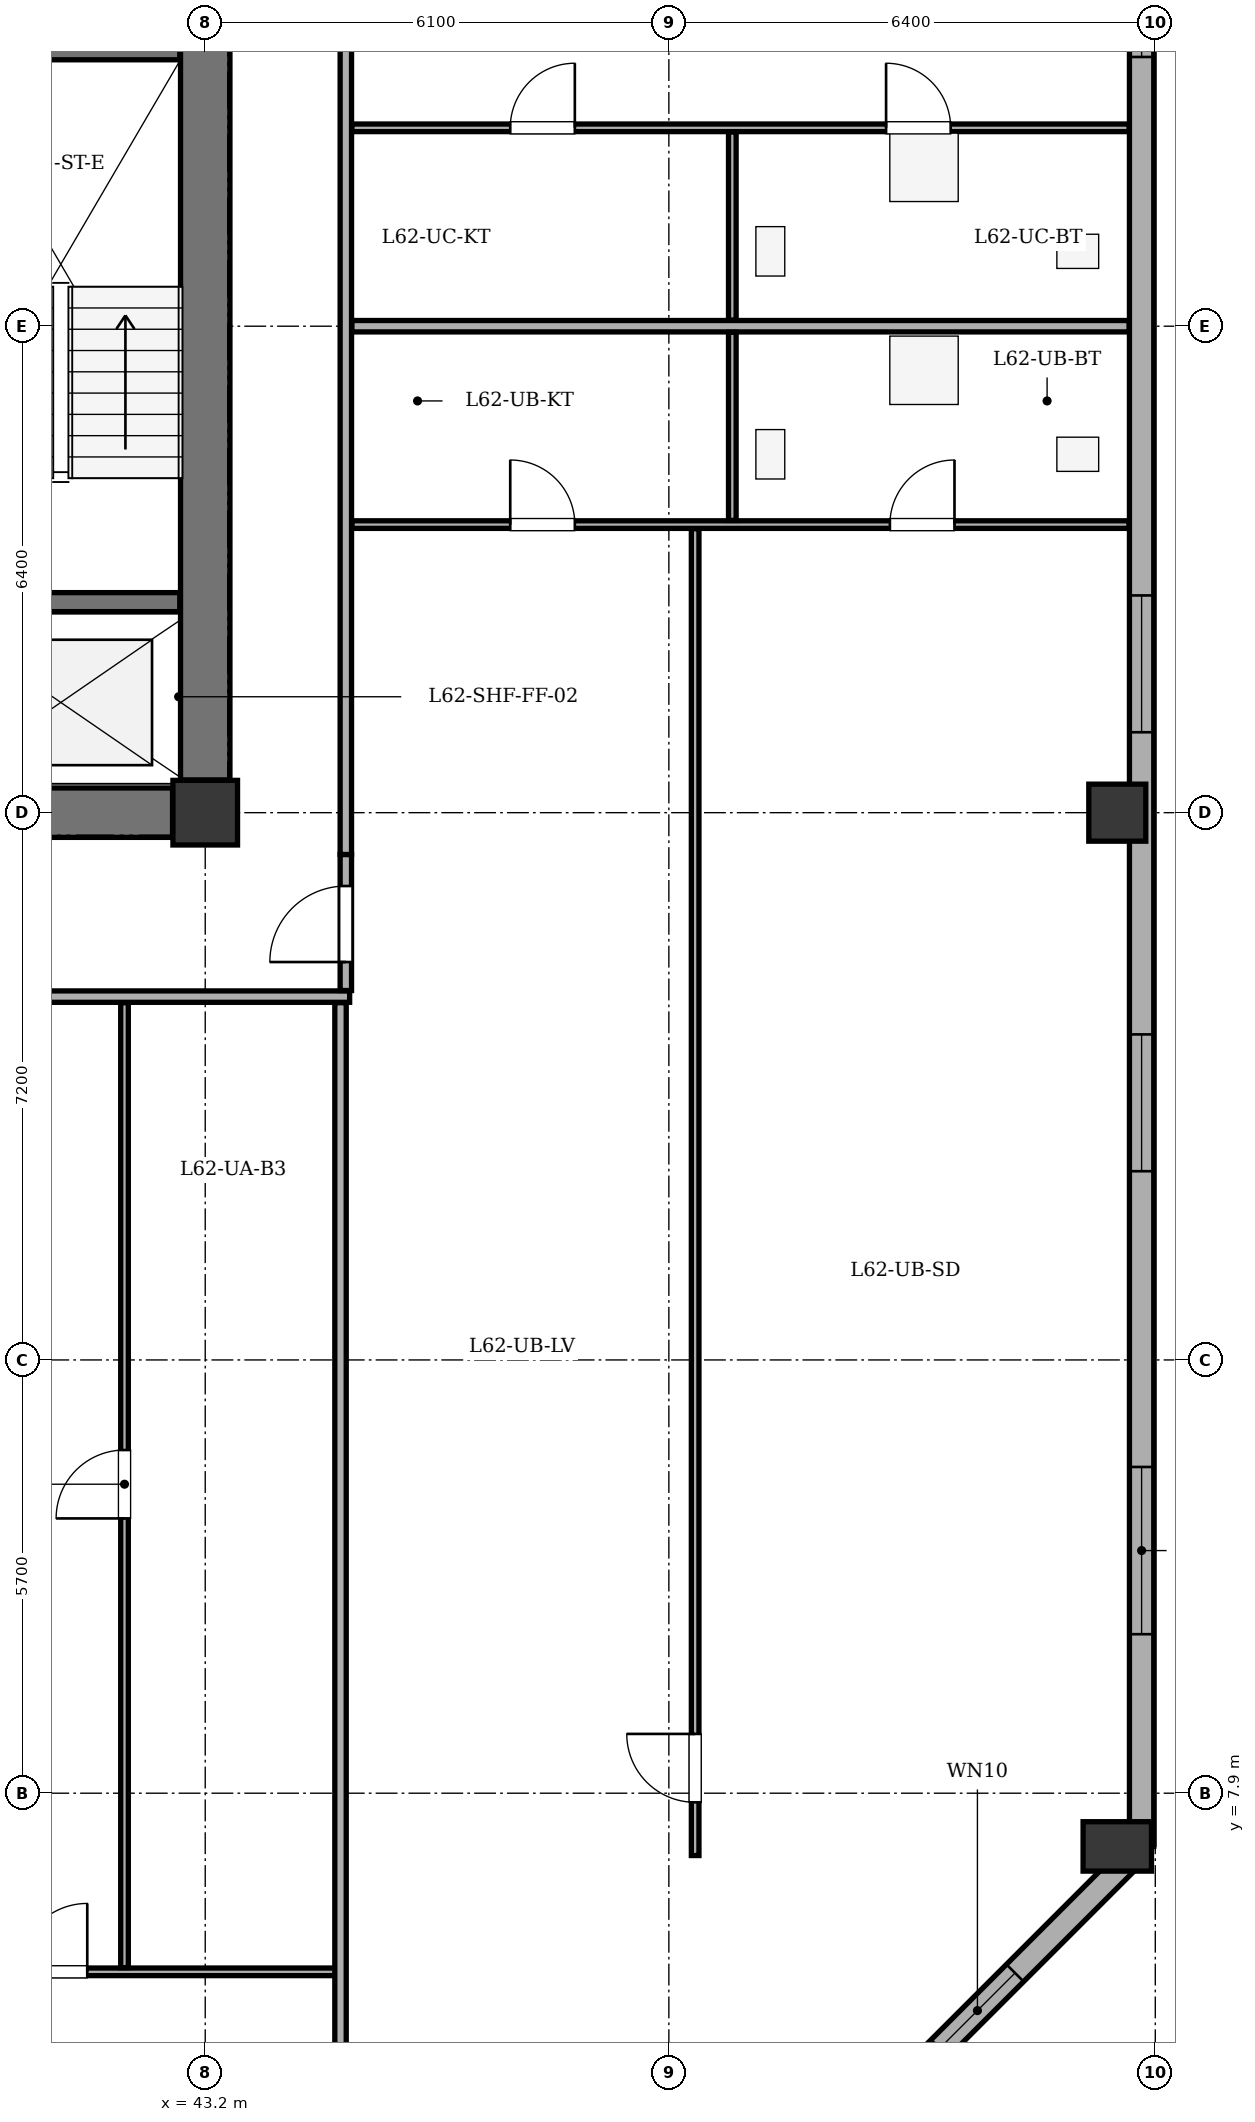
"""IFC4 building model, lengths in metres.
Left out: names, types, materials, properties, quantities, classifications, styles, units other than length and angle.
Written with IfcOpenShell. Run it as: python <this file> out.ifc"""

import sys

from ifc_helpers import new_model, si_unit, direction, frame, frame_2d, origin, origin_2d, place, context, subcontext, project, spatial, rectangle, extrude, element, fill, save


model = new_model("IFC4")
c1 = context("Model", 3, precision=1e-05, world=origin(), true_north=direction((0.0, 1.0)))
c2 = subcontext(c1, "Body", "Model", "MODEL_VIEW")
j1 = project(units=[si_unit("LENGTHUNIT", "METRE"), si_unit("PLANEANGLEUNIT", "RADIAN")], contexts=[c1])
p1 = place(None, origin())
s1 = spatial("IfcSite", under=j1, at=p1, CompositionType="ELEMENT")
p2 = place(p1, origin())
s2 = spatial("IfcBuilding", under=s1, at=p2, CompositionType="ELEMENT")
p3 = place(p2, frame((0.0, 0.0, 238.1)))
s3 = spatial("IfcBuildingStorey", under=s2, at=p3, CompositionType="ELEMENT", Elevation=238.1)
p4 = place(p3, frame((43.2, 20.8, 0.0), z_axis=(0.0, 0.0, 1.0), x_axis=(1.0, 0.0, 0.0)))
e1 = element("IfcColumn", 1, at=p4, inside=s3, PredefinedType="COLUMN", context=c2, shape_type="SweptSolid", body=[
    extrude(rectangle(XDim=0.85, YDim=0.85, at=origin_2d()), origin(), (0.0, 0.0, 1.0), 3.4),
])
p5 = place(p3, frame((55.2, 7.2, 0.0), z_axis=(0.0, 0.0, 1.0), x_axis=(1.0, 0.0, 0.0)))
e2 = element("IfcColumn", 2, at=p5, inside=s3, PredefinedType="COLUMN", context=c2, shape_type="SweptSolid", body=[
    extrude(rectangle(XDim=0.65, YDim=0.9, at=origin_2d()), origin(), (0.0, 0.0, 1.0), 3.4),
])
p6 = place(p3, frame((55.2, 20.8, 0.0), z_axis=(0.0, 0.0, 1.0), x_axis=(1.0, 0.0, 0.0)))
e3 = element("IfcColumn", 3, at=p6, inside=s3, PredefinedType="COLUMN", context=c2, shape_type="SweptSolid", body=[
    extrude(rectangle(XDim=0.75, YDim=0.75, at=origin_2d()), origin(), (0.0, 0.0, 1.0), 3.4),
])
p7 = place(p3, frame((55.52, 35.0, 0.0), z_axis=(0.0, 0.0, 1.0), x_axis=(0.0, -1.0, 0.0)))
e4 = element("IfcWall", 4, at=p7, inside=s3, PredefinedType="STANDARD", context=c2, shape_type="SweptSolid", body=[
    extrude(rectangle(XDim=27.8, YDim=0.32, at=frame_2d((13.9, 0.0))), origin(), (0.0, 0.0, 1.0), 2.725),
])
p8 = place(p7, frame((2.458, 0.0, 0.75)))
e5 = element("IfcOpeningElement", 5, at=p8, cuts=e4, PredefinedType="OPENING", context=c2, shape_type="SweptSolid", body=[
    extrude(rectangle(XDim=1.8, YDim=1.7, at=frame_2d((0.9, 0.85))), frame((0.0, 0.17, 0.0), z_axis=(0.0, -1.0, 0.0), x_axis=(1.0, 0.0, 0.0)), (0.0, 0.0, 1.0), 0.34),
])
p9 = place(p7, frame((11.342, 0.0, 0.75)))
e6 = element("IfcOpeningElement", 6, at=p9, cuts=e4, PredefinedType="OPENING", context=c2, shape_type="SweptSolid", body=[
    extrude(rectangle(XDim=1.8, YDim=1.7, at=frame_2d((0.9, 0.85))), frame((0.0, 0.17, 0.0), z_axis=(0.0, -1.0, 0.0), x_axis=(1.0, 0.0, 0.0)), (0.0, 0.0, 1.0), 0.34),
])
p10 = place(p7, frame((17.117, 0.0, 0.75)))
e7 = element("IfcOpeningElement", 7, at=p10, cuts=e4, PredefinedType="OPENING", context=c2, shape_type="SweptSolid", body=[
    extrude(rectangle(XDim=1.8, YDim=1.7, at=frame_2d((0.9, 0.85))), frame((0.0, 0.17, 0.0), z_axis=(0.0, -1.0, 0.0), x_axis=(1.0, 0.0, 0.0)), (0.0, 0.0, 1.0), 0.34),
])
p11 = place(p7, frame((22.808, 0.0, 0.75)))
e8 = element("IfcOpeningElement", 8, at=p11, cuts=e4, PredefinedType="OPENING", context=c2, shape_type="SweptSolid", body=[
    extrude(rectangle(XDim=2.2, YDim=1.7, at=frame_2d((1.1, 0.85))), frame((0.0, 0.17, 0.0), z_axis=(0.0, -1.0, 0.0), x_axis=(1.0, 0.0, 0.0)), (0.0, 0.0, 1.0), 0.34),
])
p12 = place(p3, frame((55.52, 7.2, 0.0), z_axis=(0.0, 0.0, 1.0), x_axis=(-0.707106781187, -0.707106781187, 0.0)))
e9 = element("IfcWall", 9, at=p12, inside=s3, PredefinedType="STANDARD", context=c2, shape_type="SweptSolid", body=[
    extrude(rectangle(XDim=6.11, YDim=0.32, at=frame_2d((3.055, 0.0))), origin(), (0.0, 0.0, 1.0), 2.725),
])
p13 = place(p12, frame((2.355, 0.0, 0.75)))
e10 = element("IfcOpeningElement", 10, at=p13, cuts=e9, PredefinedType="OPENING", context=c2, shape_type="SweptSolid", body=[
    extrude(rectangle(XDim=1.4, YDim=1.65, at=frame_2d((0.7, 0.825))), frame((0.0, 0.17, 0.0), z_axis=(0.0, -1.0, 0.0), x_axis=(1.0, 0.0, 0.0)), (0.0, 0.0, 1.0), 0.34),
])
p14 = place(p3, frame((43.2, 21.23, 0.0), z_axis=(0.0, 0.0, 1.0), x_axis=(0.0, 1.0, 0.0)))
e11 = element("IfcWall", 11, at=p14, inside=s3, PredefinedType="SHEAR", context=c2, shape_type="SweptSolid", body=[
    extrude(rectangle(XDim=11.94, YDim=0.65, at=frame_2d((5.97, 0.0))), origin(), (0.0, 0.0, 1.0), 3.1),
])
p15 = place(p3, frame((35.63, 20.8, 0.0), z_axis=(0.0, 0.0, 1.0), x_axis=(1.0, 0.0, 0.0)))
e12 = element("IfcWall", 12, at=p15, inside=s3, PredefinedType="SHEAR", context=c2, shape_type="SweptSolid", body=[
    extrude(rectangle(XDim=7.14, YDim=0.65, at=frame_2d((3.57, 0.0))), origin(), (0.0, 0.0, 1.0), 3.1),
])
for number, where, z_axis, x_axis in (
    (13, (39.69, 23.57, 0.0), (0.0, 0.0, 1.0), (1.0, 0.0, 0.0)),
    (14, (39.69, 30.83, 0.0), (0.0, 0.0, 1.0), (1.0, 0.0, 0.0)),
):
    element("IfcWall", number, at=place(p3, frame(where, z_axis=z_axis, x_axis=x_axis)), inside=s3, PredefinedType="SHEAR", context=c2, shape_type="SweptSolid", body=[
        extrude(rectangle(XDim=3.175, YDim=0.25, at=frame_2d((1.587, 0.0))), origin(), (0.0, 0.0, 1.0), 3.1),
    ])
p16 = place(p3, frame((15.08, 18.38, 0.0), z_axis=(0.0, 0.0, 1.0), x_axis=(1.0, 0.0, 0.0)))
e15 = element("IfcWall", 15, at=p16, inside=s3, PredefinedType="PARTITIONING", context=c2, shape_type="SweptSolid", body=[
    extrude(rectangle(XDim=30.02, YDim=0.15, at=frame_2d((15.01, 0.0))), origin(), (0.0, 0.0, 1.0), 3.1),
])
p17 = place(p16, frame((14.51, 0.0, 0.0)))
e16 = element("IfcOpeningElement", 16, at=p17, cuts=e15, PredefinedType="OPENING", context=c2, shape_type="SweptSolid", body=[
    extrude(rectangle(XDim=1.0, YDim=2.1, at=frame_2d((0.5, 1.05))), frame((0.0, 0.085, 0.0), z_axis=(0.0, -1.0, 0.0), x_axis=(1.0, 0.0, 0.0)), (0.0, 0.0, 1.0), 0.17),
])
p18 = place(p3, frame((15.28, 5.55, 0.0), z_axis=(0.0, 0.0, 1.0), x_axis=(1.0, 0.0, 0.0)))
e17 = element("IfcWall", 17, at=p18, inside=s3, PredefinedType="PARTITIONING", context=c2, shape_type="SweptSolid", body=[
    extrude(rectangle(XDim=29.74, YDim=0.1, at=frame_2d((14.87, 0.0))), origin(), (0.0, 0.0, 1.0), 3.1),
])
p19 = place(p18, frame((0.65, 0.0, 0.0)))
e18 = element("IfcOpeningElement", 18, at=p19, cuts=e17, PredefinedType="OPENING", context=c2, shape_type="SweptSolid", body=[
    extrude(rectangle(XDim=0.85, YDim=2.05, at=frame_2d((0.425, 1.025))), frame((0.0, 0.06, 0.0), z_axis=(0.0, -1.0, 0.0), x_axis=(1.0, 0.0, 0.0)), (0.0, 0.0, 1.0), 0.12),
])
p20 = place(p18, frame((8.055, 0.0, 0.0)))
e19 = element("IfcOpeningElement", 19, at=p20, cuts=e17, PredefinedType="OPENING", context=c2, shape_type="SweptSolid", body=[
    extrude(rectangle(XDim=0.85, YDim=2.05, at=frame_2d((0.425, 1.025))), frame((0.0, 0.06, 0.0), z_axis=(0.0, -1.0, 0.0), x_axis=(1.0, 0.0, 0.0)), (0.0, 0.0, 1.0), 0.12),
])
p21 = place(p18, frame((18.062, 0.0, 0.0)))
e20 = element("IfcOpeningElement", 20, at=p21, cuts=e17, PredefinedType="OPENING", context=c2, shape_type="SweptSolid", body=[
    extrude(rectangle(XDim=0.9, YDim=2.05, at=frame_2d((0.45, 1.025))), frame((0.0, 0.06, 0.0), z_axis=(0.0, -1.0, 0.0), x_axis=(1.0, 0.0, 0.0)), (0.0, 0.0, 1.0), 0.12),
])
p22 = place(p18, frame((25.468, 0.0, 0.0)))
e21 = element("IfcOpeningElement", 21, at=p22, cuts=e17, PredefinedType="OPENING", context=c2, shape_type="SweptSolid", body=[
    extrude(rectangle(XDim=0.9, YDim=2.05, at=frame_2d((0.45, 1.025))), frame((0.0, 0.06, 0.0), z_axis=(0.0, -1.0, 0.0), x_axis=(1.0, 0.0, 0.0)), (0.0, 0.0, 1.0), 0.12),
])
p23 = place(p3, frame((42.138, 5.605, 0.0), z_axis=(0.0, 0.0, 1.0), x_axis=(0.0, 1.0, 0.0)))
e22 = element("IfcWall", 22, at=p23, inside=s3, PredefinedType="PARTITIONING", context=c2, shape_type="SweptSolid", body=[
    extrude(rectangle(XDim=12.695, YDim=0.1, at=frame_2d((6.348, 0.0))), origin(), (0.0, 0.0, 1.0), 2.725),
])
p24 = place(p23, frame((5.91, 0.0, 0.0)))
e23 = element("IfcOpeningElement", 23, at=p24, cuts=e22, PredefinedType="OPENING", context=c2, shape_type="SweptSolid", body=[
    extrude(rectangle(XDim=0.9, YDim=2.05, at=frame_2d((0.45, 1.025))), frame((0.0, 0.06, 0.0), z_axis=(0.0, -1.0, 0.0), x_axis=(1.0, 0.0, 0.0)), (0.0, 0.0, 1.0), 0.12),
])
p25 = place(p3, frame((44.98, 3.045, 0.0), z_axis=(0.0, 0.0, 1.0), x_axis=(0.0, 1.0, 0.0)))
e24 = element("IfcWall", 24, at=p25, inside=s3, PredefinedType="PARTITIONING", context=c2, shape_type="SweptSolid", body=[
    extrude(rectangle(XDim=15.255, YDim=0.15, at=frame_2d((7.627, 0.0))), origin(), (0.0, 0.0, 1.0), 2.725),
])
p26 = place(p3, frame((45.05, 18.46, 0.0), z_axis=(0.0, 0.0, 1.0), x_axis=(0.0, 1.0, 0.0)))
e25 = element("IfcWall", 25, at=p26, inside=s3, PredefinedType="PARTITIONING", context=c2, shape_type="SweptSolid", body=[
    extrude(rectangle(XDim=1.79, YDim=0.15, at=frame_2d((0.895, 0.0))), origin(), (0.0, 0.0, 1.0), 2.725),
])
p27 = place(p26, frame((0.375, 0.0, 0.0)))
e26 = element("IfcOpeningElement", 26, at=p27, cuts=e25, PredefinedType="OPENING", context=c2, shape_type="SweptSolid", body=[
    extrude(rectangle(XDim=1.0, YDim=2.1, at=frame_2d((0.5, 1.05))), frame((0.0, 0.085, 0.0), z_axis=(0.0, -1.0, 0.0), x_axis=(1.0, 0.0, 0.0)), (0.0, 0.0, 1.0), 0.17),
])
p28 = place(p3, frame((45.05, 20.25, 0.0), z_axis=(0.0, 0.0, 1.0), x_axis=(0.0, 1.0, 0.0)))
e27 = element("IfcWall", 27, at=p28, inside=s3, PredefinedType="PARTITIONING", context=c2, shape_type="SweptSolid", body=[
    extrude(rectangle(XDim=13.9, YDim=0.15, at=frame_2d((6.95, 0.0))), origin(), (0.0, 0.0, 1.0), 2.725),
])
p29 = place(p3, frame((45.13, 27.2, 0.0), z_axis=(0.0, 0.0, 1.0), x_axis=(1.0, 0.0, 0.0)))
e28 = element("IfcWall", 28, at=p29, inside=s3, PredefinedType="PARTITIONING", context=c2, shape_type="SweptSolid", body=[
    extrude(rectangle(XDim=10.225, YDim=0.15, at=frame_2d((5.113, 0.0))), origin(), (0.0, 0.0, 1.0), 2.725),
])
p30 = place(p3, frame((45.13, 24.59, 0.0), z_axis=(0.0, 0.0, 1.0), x_axis=(1.0, 0.0, 0.0)))
e29 = element("IfcWall", 29, at=p30, inside=s3, PredefinedType="PARTITIONING", context=c2, shape_type="SweptSolid", body=[
    extrude(rectangle(XDim=10.225, YDim=0.1, at=frame_2d((5.113, 0.0))), origin(), (0.0, 0.0, 1.0), 3.1),
])
p31 = place(p30, frame((2.083, 0.0, 0.0)))
e30 = element("IfcOpeningElement", 30, at=p31, cuts=e29, PredefinedType="OPENING", context=c2, shape_type="SweptSolid", body=[
    extrude(rectangle(XDim=0.85, YDim=2.05, at=frame_2d((0.425, 1.025))), frame((0.0, 0.06, 0.0), z_axis=(0.0, -1.0, 0.0), x_axis=(1.0, 0.0, 0.0)), (0.0, 0.0, 1.0), 0.12),
])
p32 = place(p30, frame((7.078, 0.0, 0.0)))
e31 = element("IfcOpeningElement", 31, at=p32, cuts=e29, PredefinedType="OPENING", context=c2, shape_type="SweptSolid", body=[
    extrude(rectangle(XDim=0.85, YDim=2.05, at=frame_2d((0.425, 1.025))), frame((0.0, 0.06, 0.0), z_axis=(0.0, -1.0, 0.0), x_axis=(1.0, 0.0, 0.0)), (0.0, 0.0, 1.0), 0.12),
])
p33 = place(p3, frame((49.646, 7.08, 0.0), z_axis=(0.0, 0.0, 1.0), x_axis=(0.0, 1.0, 0.0)))
e32 = element("IfcWall", 32, at=p33, inside=s3, PredefinedType="PARTITIONING", context=c2, shape_type="SweptSolid", body=[
    extrude(rectangle(XDim=17.455, YDim=0.1, at=frame_2d((8.728, 0.0))), origin(), (0.0, 0.0, 1.0), 3.1),
])
p34 = place(p33, frame((0.7, 0.0, 0.0)))
e33 = element("IfcOpeningElement", 33, at=p34, cuts=e32, PredefinedType="OPENING", context=c2, shape_type="SweptSolid", body=[
    extrude(rectangle(XDim=0.9, YDim=2.05, at=frame_2d((0.45, 1.025))), frame((0.0, 0.06, 0.0), z_axis=(0.0, -1.0, 0.0), x_axis=(1.0, 0.0, 0.0)), (0.0, 0.0, 1.0), 0.12),
])
p35 = place(p3, frame((50.135, 24.645, 0.0), z_axis=(0.0, 0.0, 1.0), x_axis=(0.0, 1.0, 0.0)))
e34 = element("IfcWall", 34, at=p35, inside=s3, PredefinedType="PARTITIONING", context=c2, shape_type="SweptSolid", body=[
    extrude(rectangle(XDim=2.475, YDim=0.1, at=frame_2d((1.238, 0.0))), origin(), (0.0, 0.0, 1.0), 3.1),
])
p36 = place(p3, frame((45.13, 29.81, 0.0), z_axis=(0.0, 0.0, 1.0), x_axis=(1.0, 0.0, 0.0)))
e35 = element("IfcWall", 35, at=p36, inside=s3, PredefinedType="PARTITIONING", context=c2, shape_type="SweptSolid", body=[
    extrude(rectangle(XDim=10.225, YDim=0.1, at=frame_2d((5.113, 0.0))), origin(), (0.0, 0.0, 1.0), 3.1),
])
p37 = place(p36, frame((2.083, 0.0, 0.0)))
e36 = element("IfcOpeningElement", 36, at=p37, cuts=e35, PredefinedType="OPENING", context=c2, shape_type="SweptSolid", body=[
    extrude(rectangle(XDim=0.85, YDim=2.05, at=frame_2d((0.425, 1.025))), frame((0.0, 0.06, 0.0), z_axis=(0.0, -1.0, 0.0), x_axis=(1.0, 0.0, 0.0)), (0.0, 0.0, 1.0), 0.12),
])
p38 = place(p36, frame((7.028, 0.0, 0.0)))
e37 = element("IfcOpeningElement", 37, at=p38, cuts=e35, PredefinedType="OPENING", context=c2, shape_type="SweptSolid", body=[
    extrude(rectangle(XDim=0.85, YDim=2.05, at=frame_2d((0.425, 1.025))), frame((0.0, 0.06, 0.0), z_axis=(0.0, -1.0, 0.0), x_axis=(1.0, 0.0, 0.0)), (0.0, 0.0, 1.0), 0.12),
])
p39 = place(p3, frame((50.135, 27.28, 0.0), z_axis=(0.0, 0.0, 1.0), x_axis=(0.0, 1.0, 0.0)))
e38 = element("IfcWall", 38, at=p39, inside=s3, PredefinedType="PARTITIONING", context=c2, shape_type="SweptSolid", body=[
    extrude(rectangle(XDim=2.475, YDim=0.1, at=frame_2d((1.237, 0.0))), origin(), (0.0, 0.0, 1.0), 3.1),
])
p40 = place(p8, origin())
e39 = element("IfcWindow", 39, at=p40, inside=s3, PartitioningType="SINGLE_PANEL", PredefinedType="WINDOW", context=c2, shape_type="SweptSolid", body=[
    extrude(rectangle(XDim=1.8, YDim=1.7, at=frame_2d((0.9, 0.85))), frame((0.0, -0.01, 0.0), z_axis=(0.0, -1.0, 0.0), x_axis=(1.0, 0.0, 0.0)), (0.0, 0.0, 1.0), 0.06),
])
fill(e5, e39)
p41 = place(p9, origin())
e40 = element("IfcWindow", 40, at=p41, inside=s3, PartitioningType="SINGLE_PANEL", PredefinedType="WINDOW", context=c2, shape_type="SweptSolid", body=[
    extrude(rectangle(XDim=1.8, YDim=1.7, at=frame_2d((0.9, 0.85))), frame((0.0, -0.01, 0.0), z_axis=(0.0, -1.0, 0.0), x_axis=(1.0, 0.0, 0.0)), (0.0, 0.0, 1.0), 0.06),
])
fill(e6, e40)
p42 = place(p10, origin())
e41 = element("IfcWindow", 41, at=p42, inside=s3, PartitioningType="SINGLE_PANEL", PredefinedType="WINDOW", context=c2, shape_type="SweptSolid", body=[
    extrude(rectangle(XDim=1.8, YDim=1.7, at=frame_2d((0.9, 0.85))), frame((0.0, -0.01, 0.0), z_axis=(0.0, -1.0, 0.0), x_axis=(1.0, 0.0, 0.0)), (0.0, 0.0, 1.0), 0.06),
])
fill(e7, e41)
p43 = place(p11, origin())
e42 = element("IfcWindow", 42, at=p43, inside=s3, PartitioningType="SINGLE_PANEL", PredefinedType="WINDOW", context=c2, shape_type="SweptSolid", body=[
    extrude(rectangle(XDim=2.2, YDim=1.7, at=frame_2d((1.1, 0.85))), frame((0.0, -0.01, 0.0), z_axis=(0.0, -1.0, 0.0), x_axis=(1.0, 0.0, 0.0)), (0.0, 0.0, 1.0), 0.06),
])
fill(e8, e42)
p44 = place(p13, origin())
e43 = element("IfcWindow", 43, at=p44, inside=s3, PartitioningType="SINGLE_PANEL", PredefinedType="WINDOW", context=c2, shape_type="SweptSolid", body=[
    extrude(rectangle(XDim=1.4, YDim=1.65, at=frame_2d((0.7, 0.825))), frame((0.0, -0.01, 0.0), z_axis=(0.0, -1.0, 0.0), x_axis=(1.0, 0.0, 0.0)), (0.0, 0.0, 1.0), 0.06),
])
fill(e10, e43)
p45 = place(p24, origin())
e44 = element("IfcDoor", 44, at=p45, inside=s3, OperationType="SINGLE_SWING_LEFT", PredefinedType="DOOR", context=c2, shape_type="SweptSolid", body=[
    extrude(rectangle(XDim=0.9, YDim=2.05, at=frame_2d((0.45, 1.025))), frame((0.0, 0.025, 0.0), z_axis=(0.0, -1.0, 0.0), x_axis=(1.0, 0.0, 0.0)), (0.0, 0.0, 1.0), 0.05),
])
fill(e23, e44)
p46 = place(p22, origin())
e45 = element("IfcDoor", 45, at=p46, inside=s3, OperationType="SINGLE_SWING_RIGHT", PredefinedType="DOOR", context=c2, shape_type="SweptSolid", body=[
    extrude(rectangle(XDim=0.9, YDim=2.05, at=frame_2d((0.45, 1.025))), frame((0.0, 0.025, 0.0), z_axis=(0.0, -1.0, 0.0), x_axis=(1.0, 0.0, 0.0)), (0.0, 0.0, 1.0), 0.05),
])
fill(e21, e45)
p47 = place(p27, origin())
e46 = element("IfcDoor", 46, at=p47, inside=s3, OperationType="SINGLE_SWING_LEFT", PredefinedType="DOOR", context=c2, shape_type="SweptSolid", body=[
    extrude(rectangle(XDim=1.0, YDim=2.1, at=frame_2d((0.5, 1.05))), frame((0.0, 0.025, 0.0), z_axis=(0.0, -1.0, 0.0), x_axis=(1.0, 0.0, 0.0)), (0.0, 0.0, 1.0), 0.05),
])
fill(e26, e46)
p48 = place(p34, origin())
e47 = element("IfcDoor", 47, at=p48, inside=s3, OperationType="SINGLE_SWING_RIGHT", PredefinedType="DOOR", context=c2, shape_type="SweptSolid", body=[
    extrude(rectangle(XDim=0.9, YDim=2.05, at=frame_2d((0.45, 1.025))), frame((0.0, 0.025, 0.0), z_axis=(0.0, -1.0, 0.0), x_axis=(1.0, 0.0, 0.0)), (0.0, 0.0, 1.0), 0.05),
])
fill(e33, e47)
p49 = place(p31, origin())
e48 = element("IfcDoor", 48, at=p49, inside=s3, OperationType="SINGLE_SWING_LEFT", PredefinedType="DOOR", context=c2, shape_type="SweptSolid", body=[
    extrude(rectangle(XDim=0.85, YDim=2.05, at=frame_2d((0.425, 1.025))), frame((0.0, 0.025, 0.0), z_axis=(0.0, -1.0, 0.0), x_axis=(1.0, 0.0, 0.0)), (0.0, 0.0, 1.0), 0.05),
])
fill(e30, e48)
p50 = place(p32, origin())
e49 = element("IfcDoor", 49, at=p50, inside=s3, OperationType="SINGLE_SWING_RIGHT", PredefinedType="DOOR", context=c2, shape_type="SweptSolid", body=[
    extrude(rectangle(XDim=0.85, YDim=2.05, at=frame_2d((0.425, 1.025))), frame((0.0, 0.025, 0.0), z_axis=(0.0, -1.0, 0.0), x_axis=(1.0, 0.0, 0.0)), (0.0, 0.0, 1.0), 0.05),
])
fill(e31, e49)
p51 = place(p37, origin())
e50 = element("IfcDoor", 50, at=p51, inside=s3, OperationType="SINGLE_SWING_RIGHT", PredefinedType="DOOR", context=c2, shape_type="SweptSolid", body=[
    extrude(rectangle(XDim=0.85, YDim=2.05, at=frame_2d((0.425, 1.025))), frame((0.0, 0.025, 0.0), z_axis=(0.0, -1.0, 0.0), x_axis=(1.0, 0.0, 0.0)), (0.0, 0.0, 1.0), 0.05),
])
fill(e36, e50)
p52 = place(p38, origin())
e51 = element("IfcDoor", 51, at=p52, inside=s3, OperationType="SINGLE_SWING_LEFT", PredefinedType="DOOR", context=c2, shape_type="SweptSolid", body=[
    extrude(rectangle(XDim=0.85, YDim=2.05, at=frame_2d((0.425, 1.025))), frame((0.0, 0.025, 0.0), z_axis=(0.0, -1.0, 0.0), x_axis=(1.0, 0.0, 0.0)), (0.0, 0.0, 1.0), 0.05),
])
fill(e37, e51)
save(model, sys.argv[1])
